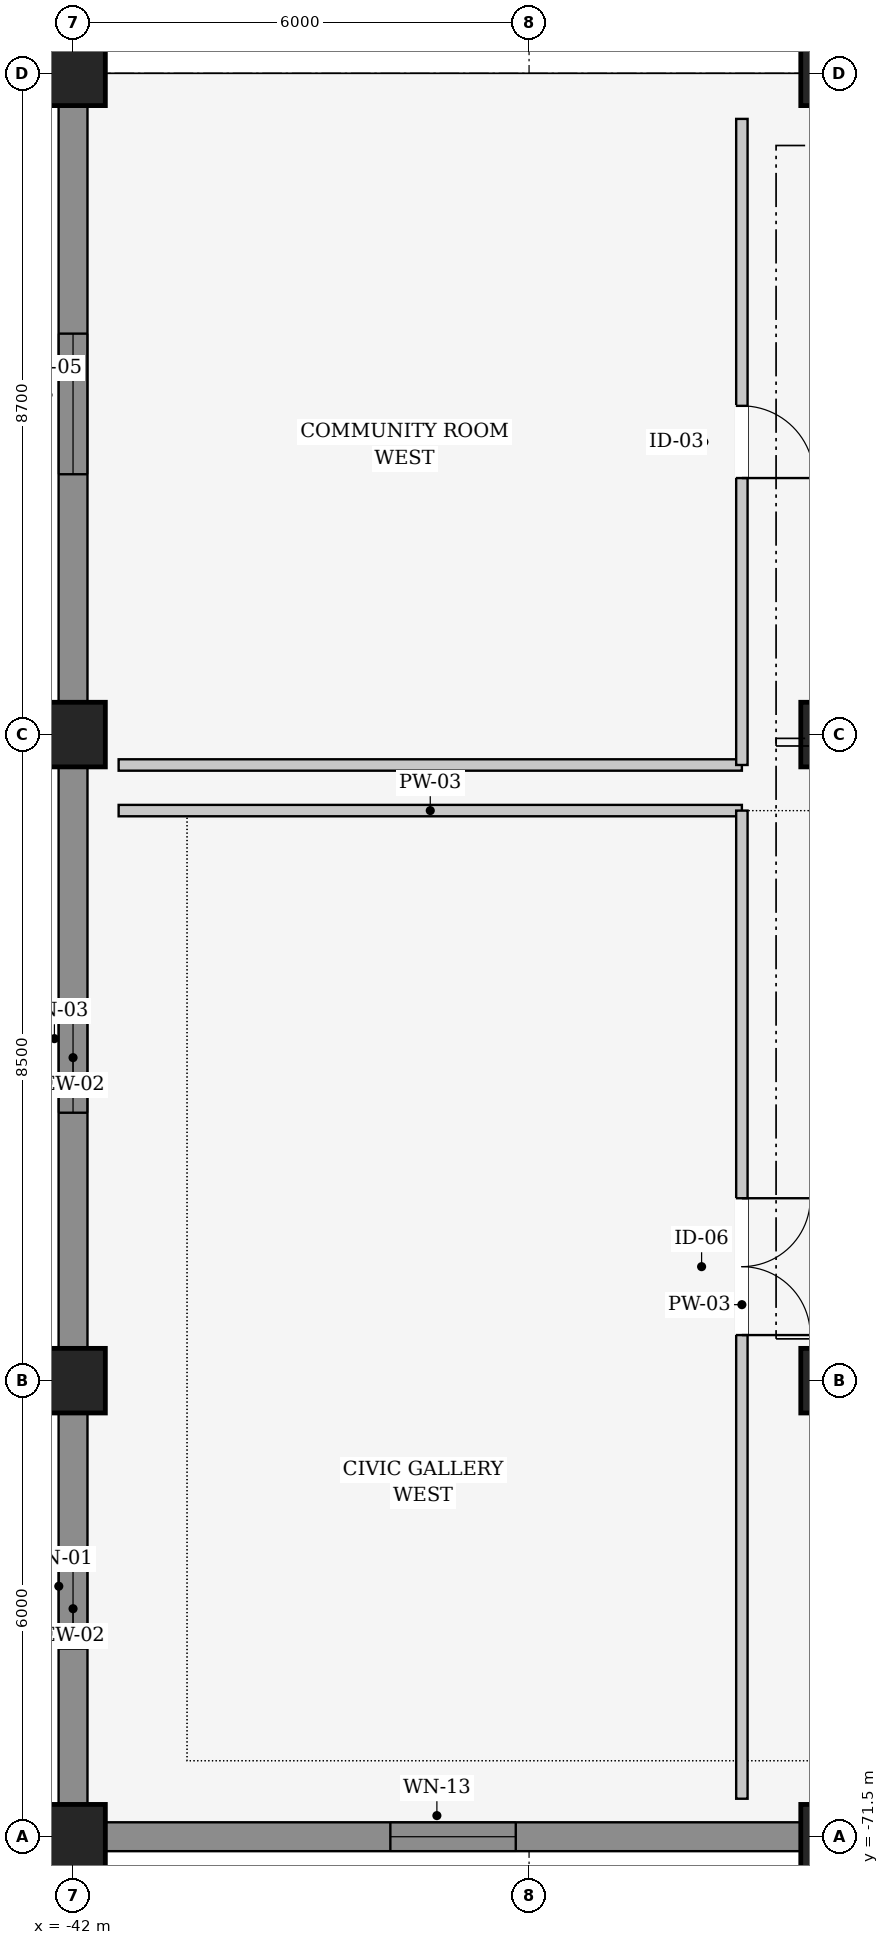
"""IFC4 building model, lengths in metres.
Left out: names, types, materials, properties, quantities, classifications, styles, units other than length and angle.
Written with IfcOpenShell. Run it as: python <this file> out.ifc"""

import sys

from ifc_helpers import new_model, si_unit, direction, frame, frame_2d, origin, origin_2d, place, context, subcontext, project, spatial, rectangle, extrude, element, fill, save


model = new_model("IFC4")
c1 = context("Model", 3, precision=1e-05, world=origin(), true_north=direction((0.0, 1.0)))
c2 = subcontext(c1, "Body", "Model", "MODEL_VIEW")
j1 = project(units=[si_unit("LENGTHUNIT", "METRE"), si_unit("PLANEANGLEUNIT", "RADIAN")], contexts=[c1])
p1 = place(None, origin())
s1 = spatial("IfcSite", under=j1, at=p1, CompositionType="ELEMENT")
p2 = place(p1, origin())
s2 = spatial("IfcBuilding", under=s1, at=p2, CompositionType="ELEMENT")
p3 = place(p2, frame((0.0, 0.0, 6.0)))
s3 = spatial("IfcBuildingStorey", under=s2, at=p3, CompositionType="ELEMENT", Elevation=6.0)
for number, where, z_axis, x_axis in (
    (1, (-42.0, -71.5, 0.0), (0.0, 0.0, 1.0), (1.0, 0.0, 0.0)),
    (2, (-42.0, -65.5, 0.0), (0.0, 0.0, 1.0), (1.0, 0.0, 0.0)),
    (3, (-42.0, -57.0, 0.0), (0.0, 0.0, 1.0), (1.0, 0.0, 0.0)),
    (4, (-42.0, -48.3, 0.0), (0.0, 0.0, 1.0), (1.0, 0.0, 0.0)),
    (5, (-32.0, -71.5, 0.0), (0.0, 0.0, 1.0), (1.0, 0.0, 0.0)),
    (6, (-32.0, -65.5, 0.0), (0.0, 0.0, 1.0), (1.0, 0.0, 0.0)),
    (7, (-32.0, -57.0, 0.0), (0.0, 0.0, 1.0), (1.0, 0.0, 0.0)),
    (8, (-32.0, -48.3, 0.0), (0.0, 0.0, 1.0), (1.0, 0.0, 0.0)),
):
    element("IfcColumn", number, at=place(p3, frame(where, z_axis=z_axis, x_axis=x_axis)), inside=s3, PredefinedType="COLUMN", context=c2, shape_type="SweptSolid", body=[
        extrude(rectangle(XDim=0.85, YDim=0.85, at=origin_2d()), origin(), (0.0, 0.0, 1.0), 5.4),
    ])
p4 = place(p3, frame((-42.0, -71.093, 0.0), z_axis=(0.0, 0.0, 1.0), x_axis=(0.0, 1.0, 0.0)))
e9 = element("IfcWall", 9, at=p4, inside=s3, PredefinedType="SOLIDWALL", context=c2, shape_type="SweptSolid", body=[
    extrude(rectangle(XDim=5.186, YDim=0.38, at=frame_2d((2.593, 0.0))), origin(), (0.0, 0.0, 1.0), 4.26),
])
p5 = place(p4, frame((2.068, 0.0, 0.95)))
e10 = element("IfcOpeningElement", 10, at=p5, cuts=e9, PredefinedType="OPENING", context=c2, shape_type="SweptSolid", body=[
    extrude(rectangle(XDim=1.05, YDim=1.25, at=frame_2d((0.525, 0.625))), frame((0.0, 0.2, 0.0), z_axis=(0.0, -1.0, 0.0), x_axis=(1.0, 0.0, 0.0)), (0.0, 0.0, 1.0), 0.4),
])
p6 = place(p3, frame((-42.0, -65.093, 0.0), z_axis=(0.0, 0.0, 1.0), x_axis=(0.0, 1.0, 0.0)))
e11 = element("IfcWall", 11, at=p6, inside=s3, PredefinedType="SOLIDWALL", context=c2, shape_type="SweptSolid", body=[
    extrude(rectangle(XDim=7.686, YDim=0.38, at=frame_2d((3.843, 0.0))), origin(), (0.0, 0.0, 1.0), 4.26),
])
p7 = place(p6, frame((3.118, 0.0, 0.95)))
e12 = element("IfcOpeningElement", 12, at=p7, cuts=e11, PredefinedType="OPENING", context=c2, shape_type="SweptSolid", body=[
    extrude(rectangle(XDim=1.45, YDim=1.25, at=frame_2d((0.725, 0.625))), frame((0.0, 0.2, 0.0), z_axis=(0.0, -1.0, 0.0), x_axis=(1.0, 0.0, 0.0)), (0.0, 0.0, 1.0), 0.4),
])
p8 = place(p3, frame((-42.0, -56.593, 0.0), z_axis=(0.0, 0.0, 1.0), x_axis=(0.0, 1.0, 0.0)))
e13 = element("IfcWall", 13, at=p8, inside=s3, PredefinedType="SOLIDWALL", context=c2, shape_type="SweptSolid", body=[
    extrude(rectangle(XDim=7.886, YDim=0.38, at=frame_2d((3.943, 0.0))), origin(), (0.0, 0.0, 1.0), 4.26),
])
p9 = place(p8, frame((3.018, 0.0, 0.95)))
e14 = element("IfcOpeningElement", 14, at=p9, cuts=e13, PredefinedType="OPENING", context=c2, shape_type="SweptSolid", body=[
    extrude(rectangle(XDim=1.85, YDim=1.25, at=frame_2d((0.925, 0.625))), frame((0.0, 0.2, 0.0), z_axis=(0.0, -1.0, 0.0), x_axis=(1.0, 0.0, 0.0)), (0.0, 0.0, 1.0), 0.4),
])
p10 = place(p3, frame((-32.407, -71.5, 0.0), z_axis=(0.0, 0.0, 1.0), x_axis=(-1.0, 0.0, 0.0)))
e15 = element("IfcWall", 15, at=p10, inside=s3, PredefinedType="SOLIDWALL", context=c2, shape_type="SweptSolid", body=[
    extrude(rectangle(XDim=9.186, YDim=0.38, at=frame_2d((4.593, 0.0))), origin(), (0.0, 0.0, 1.0), 4.26),
])
p11 = place(p10, frame((3.768, 0.0, 0.9)))
e16 = element("IfcOpeningElement", 16, at=p11, cuts=e15, PredefinedType="OPENING", context=c2, shape_type="SweptSolid", body=[
    extrude(rectangle(XDim=1.65, YDim=1.5, at=frame_2d((0.825, 0.75))), frame((0.0, 0.2, 0.0), z_axis=(0.0, -1.0, 0.0), x_axis=(1.0, 0.0, 0.0)), (0.0, 0.0, 1.0), 0.4),
])
p12 = place(p3, frame((-41.4, -58.0, 0.0), z_axis=(0.0, 0.0, 1.0), x_axis=(1.0, 0.0, 0.0)))
e17 = element("IfcWall", 17, at=p12, inside=s3, PredefinedType="PARTITIONING", context=c2, shape_type="SweptSolid", body=[
    extrude(rectangle(XDim=8.2, YDim=0.15, at=frame_2d((4.1, 0.0))), origin(), (0.0, 0.0, 1.0), 5.04),
])
p13 = place(p3, frame((-33.2, -58.0, 0.0), z_axis=(0.0, 0.0, 1.0), x_axis=(0.0, -1.0, 0.0)))
e18 = element("IfcWall", 18, at=p13, inside=s3, PredefinedType="PARTITIONING", context=c2, shape_type="SweptSolid", body=[
    extrude(rectangle(XDim=13.0, YDim=0.15, at=frame_2d((6.5, 0.0))), origin(), (0.0, 0.0, 1.0), 4.245),
])
p14 = place(p13, frame((5.1, 0.0, 0.0)))
e19 = element("IfcOpeningElement", 19, at=p14, cuts=e18, PredefinedType="OPENING", context=c2, shape_type="SweptSolid", body=[
    extrude(rectangle(XDim=1.8, YDim=2.2, at=frame_2d((0.9, 1.1))), frame((0.0, 0.085, 0.0), z_axis=(0.0, -1.0, 0.0), x_axis=(1.0, 0.0, 0.0)), (0.0, 0.0, 1.0), 0.17),
])
p15 = place(p3, frame((-33.2, -57.4, 0.0), z_axis=(0.0, 0.0, 1.0), x_axis=(-1.0, 0.0, 0.0)))
e20 = element("IfcWall", 20, at=p15, inside=s3, PredefinedType="PARTITIONING", context=c2, shape_type="SweptSolid", body=[
    extrude(rectangle(XDim=8.2, YDim=0.15, at=frame_2d((4.1, 0.0))), origin(), (0.0, 0.0, 1.0), 4.245),
])
p16 = place(p3, frame((-33.2, -48.9, 0.0), z_axis=(0.0, 0.0, 1.0), x_axis=(0.0, -1.0, 0.0)))
e21 = element("IfcWall", 21, at=p16, inside=s3, PredefinedType="PARTITIONING", context=c2, shape_type="SweptSolid", body=[
    extrude(rectangle(XDim=8.5, YDim=0.15, at=frame_2d((4.25, 0.0))), origin(), (0.0, 0.0, 1.0), 4.245),
])
p17 = place(p16, frame((3.775, 0.0, 0.0)))
e22 = element("IfcOpeningElement", 22, at=p17, cuts=e21, PredefinedType="OPENING", context=c2, shape_type="SweptSolid", body=[
    extrude(rectangle(XDim=0.95, YDim=2.15, at=frame_2d((0.475, 1.075))), frame((0.0, 0.085, 0.0), z_axis=(0.0, -1.0, 0.0), x_axis=(1.0, 0.0, 0.0)), (0.0, 0.0, 1.0), 0.17),
])
p18 = place(p5, origin())
e23 = element("IfcWindow", 23, at=p18, inside=s3, PartitioningType="SINGLE_PANEL", PredefinedType="WINDOW", context=c2, shape_type="SweptSolid", body=[
    extrude(rectangle(XDim=1.05, YDim=1.25, at=frame_2d((0.525, 0.625))), frame((0.0, 0.03, 0.0), z_axis=(0.0, -1.0, 0.0), x_axis=(1.0, 0.0, 0.0)), (0.0, 0.0, 1.0), 0.06),
])
fill(e10, e23)
p19 = place(p7, origin())
e24 = element("IfcWindow", 24, at=p19, inside=s3, PartitioningType="SINGLE_PANEL", PredefinedType="WINDOW", context=c2, shape_type="SweptSolid", body=[
    extrude(rectangle(XDim=1.45, YDim=1.25, at=frame_2d((0.725, 0.625))), frame((0.0, 0.03, 0.0), z_axis=(0.0, -1.0, 0.0), x_axis=(1.0, 0.0, 0.0)), (0.0, 0.0, 1.0), 0.06),
])
fill(e12, e24)
p20 = place(p9, origin())
e25 = element("IfcWindow", 25, at=p20, inside=s3, PartitioningType="SINGLE_PANEL", PredefinedType="WINDOW", context=c2, shape_type="SweptSolid", body=[
    extrude(rectangle(XDim=1.85, YDim=1.25, at=frame_2d((0.925, 0.625))), frame((0.0, 0.03, 0.0), z_axis=(0.0, -1.0, 0.0), x_axis=(1.0, 0.0, 0.0)), (0.0, 0.0, 1.0), 0.06),
])
fill(e14, e25)
p21 = place(p11, origin())
e26 = element("IfcWindow", 26, at=p21, inside=s3, PartitioningType="SINGLE_PANEL", PredefinedType="WINDOW", context=c2, shape_type="SweptSolid", body=[
    extrude(rectangle(XDim=1.65, YDim=1.5, at=frame_2d((0.825, 0.75))), frame((0.0, 0.03, 0.0), z_axis=(0.0, -1.0, 0.0), x_axis=(1.0, 0.0, 0.0)), (0.0, 0.0, 1.0), 0.06),
])
fill(e16, e26)
p22 = place(p14, origin())
e27 = element("IfcDoor", 27, at=p22, inside=s3, OperationType="DOUBLE_DOOR_SINGLE_SWING", PredefinedType="DOOR", context=c2, shape_type="SweptSolid", body=[
    extrude(rectangle(XDim=1.8, YDim=2.2, at=frame_2d((0.9, 1.1))), frame((0.0, 0.025, 0.0), z_axis=(0.0, -1.0, 0.0), x_axis=(1.0, 0.0, 0.0)), (0.0, 0.0, 1.0), 0.05),
])
fill(e19, e27)
p23 = place(p17, origin())
e28 = element("IfcDoor", 28, at=p23, inside=s3, OperationType="SINGLE_SWING_RIGHT", PredefinedType="DOOR", context=c2, shape_type="SweptSolid", body=[
    extrude(rectangle(XDim=0.95, YDim=2.15, at=frame_2d((0.475, 1.075))), frame((0.0, 0.025, 0.0), z_axis=(0.0, -1.0, 0.0), x_axis=(1.0, 0.0, 0.0)), (0.0, 0.0, 1.0), 0.05),
])
fill(e22, e28)
save(model, sys.argv[1])
